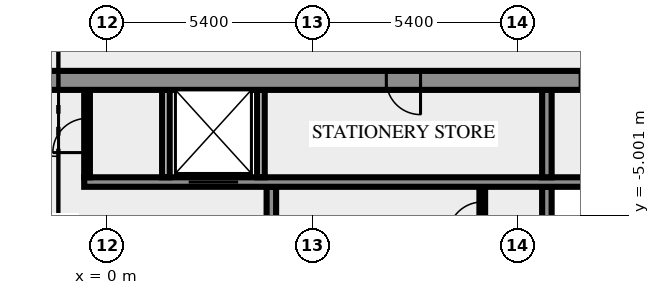
"""IFC4 building model, lengths in metres.
Left out: names, types, materials, properties, quantities, classifications, styles, units other than length and angle.
Written with IfcOpenShell. Run it as: python <this file> out.ifc"""

import sys

from ifc_helpers import new_model, si_unit, direction, frame, frame_2d, origin, place, context, subcontext, project, spatial, rectangle, extrude, element, fill, save


model = new_model("IFC4")
c1 = context("Model", 3, precision=1e-05, world=origin(), true_north=direction((0.0, 1.0)))
c2 = subcontext(c1, "Body", "Model", "MODEL_VIEW")
j1 = project(units=[si_unit("LENGTHUNIT", "METRE"), si_unit("PLANEANGLEUNIT", "RADIAN")], contexts=[c1])
p1 = place(None, origin())
s1 = spatial("IfcSite", under=j1, at=p1, CompositionType="ELEMENT")
p2 = place(p1, origin())
s2 = spatial("IfcBuilding", under=s1, at=p2, CompositionType="ELEMENT")
p3 = place(p2, frame((0.0, 0.0, 307.0)))
s3 = spatial("IfcBuildingStorey", under=s2, at=p3, CompositionType="ELEMENT", Elevation=307.0)
p4 = place(p3, frame((4.325, -7.25, 0.0), z_axis=(0.0, 0.0, 1.0), x_axis=(0.0, 1.0, 0.0)))
e1 = element("IfcWall", 1, at=p4, inside=s3, PredefinedType="SHEAR", context=c2, shape_type="SweptSolid", body=[
    extrude(rectangle(XDim=3.0, YDim=0.25, at=frame_2d((1.5, 0.0))), origin(), (0.0, 0.0, 1.0), 3.65),
])
p5 = place(p4, frame((0.8, 0.0, 0.0)))
e2 = element("IfcOpeningElement", 2, at=p5, cuts=e1, PredefinedType="OPENING", context=c2, shape_type="SweptSolid", body=[
    extrude(rectangle(XDim=1.4, YDim=2.1, at=frame_2d((0.7, 1.05))), frame((0.0, 0.135, 0.0), z_axis=(0.0, -1.0, 0.0), x_axis=(1.0, 0.0, 0.0)), (0.0, 0.0, 1.0), 0.27),
])
p6 = place(p3, frame((9.875, -6.0, 0.0), z_axis=(0.0, 0.0, 1.0), x_axis=(0.0, 1.0, 0.0)))
e3 = element("IfcWall", 3, at=p6, inside=s3, PredefinedType="PARTITIONING", context=c2, shape_type="SweptSolid", body=[
    extrude(rectangle(XDim=1.75, YDim=0.15, at=frame_2d((0.875, 0.0))), origin(), (0.0, 0.0, 1.0), 3.65),
])
p7 = place(p6, frame((0.45, 0.0, 0.0)))
e4 = element("IfcOpeningElement", 4, at=p7, cuts=e3, PredefinedType="OPENING", context=c2, shape_type="SweptSolid", body=[
    extrude(rectangle(XDim=0.9, YDim=2.1, at=frame_2d((0.45, 1.05))), frame((0.0, 0.085, 0.0), z_axis=(0.0, -1.0, 0.0), x_axis=(1.0, 0.0, 0.0)), (0.0, 0.0, 1.0), 0.17),
])
p8 = place(p3, frame((11.575, -6.0, 0.0), z_axis=(0.0, 0.0, 1.0), x_axis=(0.0, 1.0, 0.0)))
e5 = element("IfcWall", 5, at=p8, inside=s3, PredefinedType="SHEAR", context=c2, shape_type="SweptSolid", body=[
    extrude(rectangle(XDim=1.75, YDim=0.25, at=frame_2d((0.875, 0.0))), origin(), (0.0, 0.0, 1.0), 3.65),
])
p9 = place(p3, frame((-0.6, -4.125, 0.0), z_axis=(0.0, 0.0, 1.0), x_axis=(1.0, 0.0, 0.0)))
e6 = element("IfcWall", 6, at=p9, inside=s3, PredefinedType="SHEAR", context=c2, shape_type="SweptSolid", body=[
    extrude(rectangle(XDim=14.95, YDim=0.25, at=frame_2d((7.475, 0.0))), origin(), (0.0, 0.0, 1.0), 3.65),
])
p10 = place(p9, frame((2.75, 0.0, 0.0)))
e7 = element("IfcOpeningElement", 7, at=p10, cuts=e6, PredefinedType="OPENING", context=c2, shape_type="SweptSolid", body=[
    extrude(rectangle(XDim=1.3, YDim=2.1, at=frame_2d((0.65, 1.05))), frame((0.0, 0.135, 0.0), z_axis=(0.0, -1.0, 0.0), x_axis=(1.0, 0.0, 0.0)), (0.0, 0.0, 1.0), 0.27),
])
p11 = place(p3, frame((-0.525, -4.0, 0.0), z_axis=(0.0, 0.0, 1.0), x_axis=(0.0, 1.0, 0.0)))
e8 = element("IfcWall", 8, at=p11, inside=s3, PredefinedType="PARTITIONING", context=c2, shape_type="SweptSolid", body=[
    extrude(rectangle(XDim=2.3, YDim=0.15, at=frame_2d((1.15, 0.0))), origin(), (0.0, 0.0, 1.0), 3.65),
])
p12 = place(p11, frame((0.65, 0.0, 0.0)))
e9 = element("IfcOpeningElement", 9, at=p12, cuts=e8, PredefinedType="OPENING", context=c2, shape_type="SweptSolid", body=[
    extrude(rectangle(XDim=0.9, YDim=2.1, at=frame_2d((0.45, 1.05))), frame((0.0, 0.085, 0.0), z_axis=(0.0, -1.0, 0.0), x_axis=(1.0, 0.0, 0.0)), (0.0, 0.0, 1.0), 0.17),
])
for number, where, z_axis, x_axis in (
    (10, (1.55, -4.0, 0.0), (0.0, 0.0, 1.0), (0.0, 1.0, 0.0)),
    (11, (4.05, -4.0, 0.0), (0.0, 0.0, 1.0), (0.0, 1.0, 0.0)),
):
    element("IfcWall", number, at=place(p3, frame(where, z_axis=z_axis, x_axis=x_axis)), inside=s3, PredefinedType="SOLIDWALL", context=c2, shape_type="SweptSolid", body=[
        extrude(rectangle(XDim=2.3, YDim=0.2, at=frame_2d((1.15, 0.0))), origin(), (0.0, 0.0, 1.0), 3.65),
    ])
p13 = place(p3, frame((11.575, -4.0, 0.0), z_axis=(0.0, 0.0, 1.0), x_axis=(0.0, 1.0, 0.0)))
e12 = element("IfcWall", 12, at=p13, inside=s3, PredefinedType="SHEAR", context=c2, shape_type="SweptSolid", body=[
    extrude(rectangle(XDim=2.3, YDim=0.25, at=frame_2d((1.15, 0.0))), origin(), (0.0, 0.0, 1.0), 3.65),
])
p14 = place(p3, frame((20.49, -1.45, 0.0), z_axis=(0.0, 0.0, 1.0), x_axis=(-1.0, 0.0, 0.0)))
e13 = element("IfcWall", 13, at=p14, inside=s3, PredefinedType="SHEAR", context=c2, shape_type="SweptSolid", body=[
    extrude(rectangle(XDim=40.98, YDim=0.5, at=frame_2d((20.49, 0.0))), origin(), (0.0, 0.0, 1.0), 3.65),
])
p15 = place(p14, frame((38.14, 0.0, 0.0)))
e14 = element("IfcOpeningElement", 14, at=p15, cuts=e13, PredefinedType="OPENING", context=c2, shape_type="SweptSolid", body=[
    extrude(rectangle(XDim=1.8, YDim=2.1, at=frame_2d((0.9, 1.05))), frame((0.0, 0.26, 0.0), z_axis=(0.0, -1.0, 0.0), x_axis=(1.0, 0.0, 0.0)), (0.0, 0.0, 1.0), 0.52),
])
p16 = place(p14, frame((35.89, 0.0, 0.0)))
e15 = element("IfcOpeningElement", 15, at=p16, cuts=e13, PredefinedType="OPENING", context=c2, shape_type="SweptSolid", body=[
    extrude(rectangle(XDim=0.9, YDim=2.1, at=frame_2d((0.45, 1.05))), frame((0.0, 0.26, 0.0), z_axis=(0.0, -1.0, 0.0), x_axis=(1.0, 0.0, 0.0)), (0.0, 0.0, 1.0), 0.52),
])
p17 = place(p14, frame((32.94, 0.0, 0.0)))
e16 = element("IfcOpeningElement", 16, at=p17, cuts=e13, PredefinedType="OPENING", context=c2, shape_type="SweptSolid", body=[
    extrude(rectangle(XDim=0.9, YDim=2.1, at=frame_2d((0.45, 1.05))), frame((0.0, 0.26, 0.0), z_axis=(0.0, -1.0, 0.0), x_axis=(1.0, 0.0, 0.0)), (0.0, 0.0, 1.0), 0.52),
])
p18 = place(p14, frame((31.015, 0.0, 0.0)))
e17 = element("IfcOpeningElement", 17, at=p18, cuts=e13, PredefinedType="OPENING", context=c2, shape_type="SweptSolid", body=[
    extrude(rectangle(XDim=0.8, YDim=2.1, at=frame_2d((0.4, 1.05))), frame((0.0, 0.26, 0.0), z_axis=(0.0, -1.0, 0.0), x_axis=(1.0, 0.0, 0.0)), (0.0, 0.0, 1.0), 0.52),
])
p19 = place(p14, frame((24.765, 0.0, 0.0)))
e18 = element("IfcOpeningElement", 18, at=p19, cuts=e13, PredefinedType="OPENING", context=c2, shape_type="SweptSolid", body=[
    extrude(rectangle(XDim=0.8, YDim=2.1, at=frame_2d((0.4, 1.05))), frame((0.0, 0.26, 0.0), z_axis=(0.0, -1.0, 0.0), x_axis=(1.0, 0.0, 0.0)), (0.0, 0.0, 1.0), 0.52),
])
p20 = place(p14, frame((21.765, 0.0, 0.0)))
e19 = element("IfcOpeningElement", 19, at=p20, cuts=e13, PredefinedType="OPENING", context=c2, shape_type="SweptSolid", body=[
    extrude(rectangle(XDim=2.0, YDim=2.1, at=frame_2d((1.0, 1.05))), frame((0.0, 0.26, 0.0), z_axis=(0.0, -1.0, 0.0), x_axis=(1.0, 0.0, 0.0)), (0.0, 0.0, 1.0), 0.52),
])
p21 = place(p14, frame((12.24, 0.0, 0.0)))
e20 = element("IfcOpeningElement", 20, at=p21, cuts=e13, PredefinedType="OPENING", context=c2, shape_type="SweptSolid", body=[
    extrude(rectangle(XDim=0.9, YDim=2.1, at=frame_2d((0.45, 1.05))), frame((0.0, 0.26, 0.0), z_axis=(0.0, -1.0, 0.0), x_axis=(1.0, 0.0, 0.0)), (0.0, 0.0, 1.0), 0.52),
])
p22 = place(p14, frame((7.14, 0.0, 0.0)))
e21 = element("IfcOpeningElement", 21, at=p22, cuts=e13, PredefinedType="OPENING", context=c2, shape_type="SweptSolid", body=[
    extrude(rectangle(XDim=0.9, YDim=2.1, at=frame_2d((0.45, 1.05))), frame((0.0, 0.26, 0.0), z_axis=(0.0, -1.0, 0.0), x_axis=(1.0, 0.0, 0.0)), (0.0, 0.0, 1.0), 0.52),
])
p23 = place(p14, frame((5.028, 0.0, 0.0)))
e22 = element("IfcOpeningElement", 22, at=p23, cuts=e13, PredefinedType="OPENING", context=c2, shape_type="SweptSolid", body=[
    extrude(rectangle(XDim=0.8, YDim=2.1, at=frame_2d((0.4, 1.05))), frame((0.0, 0.26, 0.0), z_axis=(0.0, -1.0, 0.0), x_axis=(1.0, 0.0, 0.0)), (0.0, 0.0, 1.0), 0.52),
])
p24 = place(p14, frame((3.452, 0.0, 0.0)))
e23 = element("IfcOpeningElement", 23, at=p24, cuts=e13, PredefinedType="OPENING", context=c2, shape_type="SweptSolid", body=[
    extrude(rectangle(XDim=0.8, YDim=2.1, at=frame_2d((0.4, 1.05))), frame((0.0, 0.26, 0.0), z_axis=(0.0, -1.0, 0.0), x_axis=(1.0, 0.0, 0.0)), (0.0, 0.0, 1.0), 0.52),
])
p25 = place(p14, frame((1.04, 0.0, 0.0)))
e24 = element("IfcOpeningElement", 24, at=p25, cuts=e13, PredefinedType="OPENING", context=c2, shape_type="SweptSolid", body=[
    extrude(rectangle(XDim=1.8, YDim=2.1, at=frame_2d((0.9, 1.05))), frame((0.0, 0.26, 0.0), z_axis=(0.0, -1.0, 0.0), x_axis=(1.0, 0.0, 0.0)), (0.0, 0.0, 1.0), 0.52),
])
p26 = place(p7, origin())
e25 = element("IfcDoor", 25, at=p26, inside=s3, OperationType="SINGLE_SWING_RIGHT", PredefinedType="DOOR", context=c2, shape_type="SweptSolid", body=[
    extrude(rectangle(XDim=0.9, YDim=2.1, at=frame_2d((0.45, 1.05))), frame((0.0, 0.025, 0.0), z_axis=(0.0, -1.0, 0.0), x_axis=(1.0, 0.0, 0.0)), (0.0, 0.0, 1.0), 0.05),
])
fill(e4, e25)
p27 = place(p10, origin())
e26 = element("IfcDoor", 26, at=p27, inside=s3, OperationType="DOUBLE_DOOR_SLIDING", PredefinedType="DOOR", context=c2, shape_type="SweptSolid", body=[
    extrude(rectangle(XDim=1.3, YDim=2.1, at=frame_2d((0.65, 1.05))), frame((0.0, 0.025, 0.0), z_axis=(0.0, -1.0, 0.0), x_axis=(1.0, 0.0, 0.0)), (0.0, 0.0, 1.0), 0.05),
])
fill(e7, e26)
p28 = place(p12, origin())
e27 = element("IfcDoor", 27, at=p28, inside=s3, OperationType="SINGLE_SWING_LEFT", PredefinedType="DOOR", context=c2, shape_type="SweptSolid", body=[
    extrude(rectangle(XDim=0.9, YDim=2.1, at=frame_2d((0.45, 1.05))), frame((0.0, 0.025, 0.0), z_axis=(0.0, -1.0, 0.0), x_axis=(1.0, 0.0, 0.0)), (0.0, 0.0, 1.0), 0.05),
])
fill(e9, e27)
p29 = place(p20, origin())
e28 = element("IfcDoor", 28, at=p29, inside=s3, OperationType="DOUBLE_DOOR_SINGLE_SWING", PredefinedType="DOOR", context=c2, shape_type="SweptSolid", body=[
    extrude(rectangle(XDim=2.0, YDim=2.1, at=frame_2d((1.0, 1.05))), frame((0.0, 0.025, 0.0), z_axis=(0.0, -1.0, 0.0), x_axis=(1.0, 0.0, 0.0)), (0.0, 0.0, 1.0), 0.05),
])
fill(e19, e28)
p30 = place(p21, origin())
e29 = element("IfcDoor", 29, at=p30, inside=s3, OperationType="SINGLE_SWING_LEFT", PredefinedType="DOOR", context=c2, shape_type="SweptSolid", body=[
    extrude(rectangle(XDim=0.9, YDim=2.1, at=frame_2d((0.45, 1.05))), frame((0.0, 0.025, 0.0), z_axis=(0.0, -1.0, 0.0), x_axis=(1.0, 0.0, 0.0)), (0.0, 0.0, 1.0), 0.05),
])
fill(e20, e29)
save(model, sys.argv[1])
